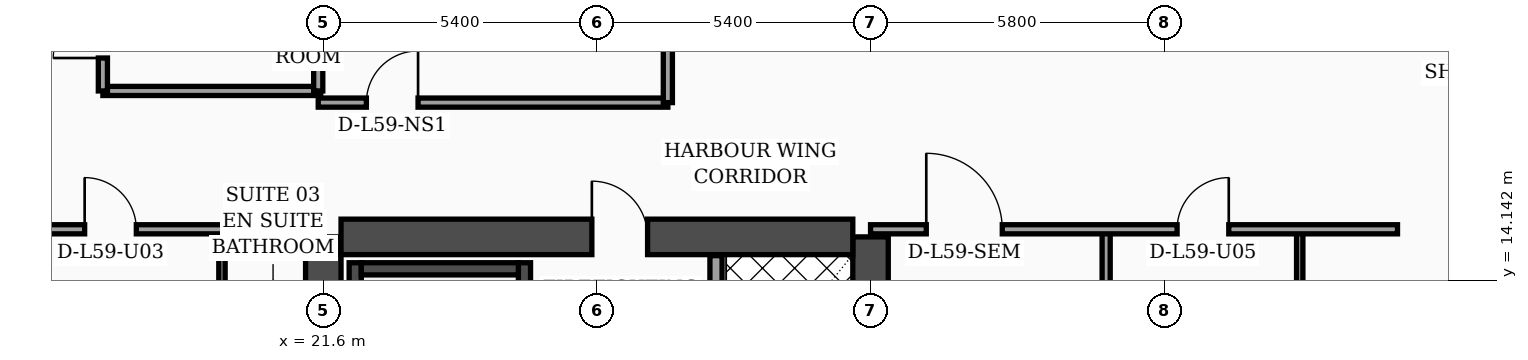
"""IFC4 building model, lengths in metres.
Left out: names, types, materials, properties, quantities, classifications, styles, units other than length and angle.
Written with IfcOpenShell. Run it as: python <this file> out.ifc"""

import sys

from ifc_helpers import new_model, si_unit, direction, frame, frame_2d, origin, place, context, subcontext, project, spatial, rectangle, extrude, element, fill, save


model = new_model("IFC4")
c1 = context("Model", 3, precision=1e-05, world=origin(), true_north=direction((0.0, 1.0)))
c2 = subcontext(c1, "Body", "Model", "MODEL_VIEW")
j1 = project(units=[si_unit("LENGTHUNIT", "METRE"), si_unit("PLANEANGLEUNIT", "RADIAN")], contexts=[c1])
p1 = place(None, origin())
s1 = spatial("IfcSite", under=j1, at=p1, CompositionType="ELEMENT")
p2 = place(p1, origin())
s2 = spatial("IfcBuilding", under=s1, at=p2, CompositionType="ELEMENT")
p3 = place(p2, frame((0.0, 0.0, 239.3)))
s3 = spatial("IfcBuildingStorey", under=s2, at=p3, CompositionType="ELEMENT", Elevation=239.3)
for number, where, z_axis, x_axis in (
    (1, (21.6, 4.6, 0.0), (0.0, 0.0, 1.0), (0.0, 1.0, 0.0)),
    (2, (32.4, 4.6, 0.0), (0.0, 0.0, 1.0), (0.0, 1.0, 0.0)),
):
    element("IfcWall", number, at=place(p3, frame(where, z_axis=z_axis, x_axis=x_axis)), inside=s3, PredefinedType="SHEAR", context=c2, shape_type="SweptSolid", body=[
        extrude(rectangle(XDim=10.4, YDim=0.7, at=frame_2d((5.2, 0.0))), origin(), (0.0, 0.0, 1.0), 4.05),
    ])
p4 = place(p3, frame((21.95, 15.0, 0.0), z_axis=(0.0, 0.0, 1.0), x_axis=(1.0, 0.0, 0.0)))
e3 = element("IfcWall", 3, at=p4, inside=s3, PredefinedType="SHEAR", context=c2, shape_type="SweptSolid", body=[
    extrude(rectangle(XDim=10.1, YDim=0.7, at=frame_2d((5.05, 0.0))), origin(), (0.0, 0.0, 1.0), 4.05),
])
p5 = place(p4, frame((4.95, 0.0, 0.0)))
e4 = element("IfcOpeningElement", 4, at=p5, cuts=e3, PredefinedType="OPENING", context=c2, shape_type="SweptSolid", body=[
    extrude(rectangle(XDim=1.1, YDim=2.2, at=frame_2d((0.55, 1.1))), frame((0.0, 0.36, 0.0), z_axis=(0.0, -1.0, 0.0), x_axis=(1.0, 0.0, 0.0)), (0.0, 0.0, 1.0), 0.72),
])
p6 = place(p3, frame((22.23, 4.95, 0.0), z_axis=(0.0, 0.0, 1.0), x_axis=(0.0, 1.0, 0.0)))
e5 = element("IfcWall", 5, at=p6, inside=s3, PredefinedType="SOLIDWALL", context=c2, shape_type="SweptSolid", body=[
    extrude(rectangle(XDim=9.54, YDim=0.24, at=frame_2d((4.77, 0.0))), origin(), (0.0, 0.0, 1.0), 4.05),
])
p7 = place(p3, frame((25.57, 4.95, 0.0), z_axis=(0.0, 0.0, 1.0), x_axis=(0.0, 1.0, 0.0)))
e6 = element("IfcWall", 6, at=p7, inside=s3, PredefinedType="SOLIDWALL", context=c2, shape_type="SweptSolid", body=[
    extrude(rectangle(XDim=9.54, YDim=0.24, at=frame_2d((4.77, 0.0))), origin(), (0.0, 0.0, 1.0), 4.05),
])
p8 = place(p7, frame((0.35, 0.0, 0.0)))
e7 = element("IfcOpeningElement", 7, at=p8, cuts=e6, PredefinedType="OPENING", context=c2, shape_type="SweptSolid", body=[
    extrude(rectangle(XDim=1.15, YDim=2.2, at=frame_2d((0.575, 1.1))), frame((0.0, 0.13, 0.0), z_axis=(0.0, -1.0, 0.0), x_axis=(1.0, 0.0, 0.0)), (0.0, 0.0, 1.0), 0.26),
])
p9 = place(p3, frame((22.35, 14.37, 0.0), z_axis=(0.0, 0.0, 1.0), x_axis=(1.0, 0.0, 0.0)))
e8 = element("IfcWall", 8, at=p9, inside=s3, PredefinedType="SOLIDWALL", context=c2, shape_type="SweptSolid", body=[
    extrude(rectangle(XDim=3.1, YDim=0.24, at=frame_2d((1.55, 0.0))), origin(), (0.0, 0.0, 1.0), 4.05),
])
p10 = place(p3, frame((49.43, 5.505, 0.0), z_axis=(0.0, 0.0, 1.0), x_axis=(-0.300509063924, 0.953778958931, 0.0)))
e9 = element("IfcWall", 9, at=p10, inside=s3, PredefinedType="SOLIDWALL", context=c2, shape_type="SweptSolid", body=[
    extrude(rectangle(XDim=30.814, YDim=0.32, at=frame_2d((15.407, 0.0))), origin(), (0.0, 0.0, 1.0), 4.05),
])
p11 = place(p10, frame((4.747, 0.0, 0.0)))
e10 = element("IfcOpeningElement", 10, at=p11, cuts=e9, PredefinedType="OPENING", context=c2, shape_type="SweptSolid", body=[
    extrude(rectangle(XDim=1.4, YDim=2.25, at=frame_2d((0.7, 1.125))), frame((0.0, 0.17, 0.0), z_axis=(0.0, -1.0, 0.0), x_axis=(1.0, 0.0, 0.0)), (0.0, 0.0, 1.0), 0.34),
])
p12 = place(p10, frame((9.889, 0.0, 0.7)))
e11 = element("IfcOpeningElement", 11, at=p12, cuts=e9, PredefinedType="OPENING", context=c2, shape_type="SweptSolid", body=[
    extrude(rectangle(XDim=1.6, YDim=1.65, at=frame_2d((0.8, 0.825))), frame((0.0, 0.17, 0.0), z_axis=(0.0, -1.0, 0.0), x_axis=(1.0, 0.0, 0.0)), (0.0, 0.0, 1.0), 0.34),
])
p13 = place(p10, frame((18.696, 0.0, 0.7)))
e12 = element("IfcOpeningElement", 12, at=p13, cuts=e9, PredefinedType="OPENING", context=c2, shape_type="SweptSolid", body=[
    extrude(rectangle(XDim=1.6, YDim=1.65, at=frame_2d((0.8, 0.825))), frame((0.0, 0.17, 0.0), z_axis=(0.0, -1.0, 0.0), x_axis=(1.0, 0.0, 0.0)), (0.0, 0.0, 1.0), 0.34),
])
p14 = place(p10, frame((1.6, 0.0, 0.75)))
e13 = element("IfcOpeningElement", 13, at=p14, cuts=e9, PredefinedType="OPENING", context=c2, shape_type="SweptSolid", body=[
    extrude(rectangle(XDim=1.5, YDim=1.6, at=frame_2d((0.75, 0.8))), frame((0.0, 0.17, 0.0), z_axis=(0.0, -1.0, 0.0), x_axis=(1.0, 0.0, 0.0)), (0.0, 0.0, 1.0), 0.34),
])
p15 = place(p10, frame((7.8, 0.0, 0.75)))
e14 = element("IfcOpeningElement", 14, at=p15, cuts=e9, PredefinedType="OPENING", context=c2, shape_type="SweptSolid", body=[
    extrude(rectangle(XDim=1.5, YDim=1.6, at=frame_2d((0.75, 0.8))), frame((0.0, 0.17, 0.0), z_axis=(0.0, -1.0, 0.0), x_axis=(1.0, 0.0, 0.0)), (0.0, 0.0, 1.0), 0.34),
])
p16 = place(p10, frame((11.95, 0.0, 0.75)))
e15 = element("IfcOpeningElement", 15, at=p16, cuts=e9, PredefinedType="OPENING", context=c2, shape_type="SweptSolid", body=[
    extrude(rectangle(XDim=1.5, YDim=1.6, at=frame_2d((0.75, 0.8))), frame((0.0, 0.17, 0.0), z_axis=(0.0, -1.0, 0.0), x_axis=(1.0, 0.0, 0.0)), (0.0, 0.0, 1.0), 0.34),
])
p17 = place(p10, frame((14.0, 0.0, 0.75)))
e16 = element("IfcOpeningElement", 16, at=p17, cuts=e9, PredefinedType="OPENING", context=c2, shape_type="SweptSolid", body=[
    extrude(rectangle(XDim=1.5, YDim=1.6, at=frame_2d((0.75, 0.8))), frame((0.0, 0.17, 0.0), z_axis=(0.0, -1.0, 0.0), x_axis=(1.0, 0.0, 0.0)), (0.0, 0.0, 1.0), 0.34),
])
p18 = place(p10, frame((16.55, 0.0, 0.75)))
e17 = element("IfcOpeningElement", 17, at=p18, cuts=e9, PredefinedType="OPENING", context=c2, shape_type="SweptSolid", body=[
    extrude(rectangle(XDim=1.5, YDim=1.6, at=frame_2d((0.75, 0.8))), frame((0.0, 0.17, 0.0), z_axis=(0.0, -1.0, 0.0), x_axis=(1.0, 0.0, 0.0)), (0.0, 0.0, 1.0), 0.34),
])
p19 = place(p10, frame((20.75, 0.0, 0.75)))
e18 = element("IfcOpeningElement", 18, at=p19, cuts=e9, PredefinedType="OPENING", context=c2, shape_type="SweptSolid", body=[
    extrude(rectangle(XDim=1.5, YDim=1.6, at=frame_2d((0.75, 0.8))), frame((0.0, 0.17, 0.0), z_axis=(0.0, -1.0, 0.0), x_axis=(1.0, 0.0, 0.0)), (0.0, 0.0, 1.0), 0.34),
])
p20 = place(p10, frame((23.3, 0.0, 0.75)))
e19 = element("IfcOpeningElement", 19, at=p20, cuts=e9, PredefinedType="OPENING", context=c2, shape_type="SweptSolid", body=[
    extrude(rectangle(XDim=1.5, YDim=1.6, at=frame_2d((0.75, 0.8))), frame((0.0, 0.17, 0.0), z_axis=(0.0, -1.0, 0.0), x_axis=(1.0, 0.0, 0.0)), (0.0, 0.0, 1.0), 0.34),
])
p21 = place(p10, frame((26.4, 0.0, 0.75)))
e20 = element("IfcOpeningElement", 20, at=p21, cuts=e9, PredefinedType="OPENING", context=c2, shape_type="SweptSolid", body=[
    extrude(rectangle(XDim=1.5, YDim=1.6, at=frame_2d((0.75, 0.8))), frame((0.0, 0.17, 0.0), z_axis=(0.0, -1.0, 0.0), x_axis=(1.0, 0.0, 0.0)), (0.0, 0.0, 1.0), 0.34),
])
p22 = place(p3, frame((29.35, 4.97, 0.0), z_axis=(0.0, 0.0, 1.0), x_axis=(0.0, 1.0, 0.0)))
e21 = element("IfcWall", 21, at=p22, inside=s3, PredefinedType="SOLIDWALL", context=c2, shape_type="SweptSolid", body=[
    extrude(rectangle(XDim=9.66, YDim=0.24, at=frame_2d((4.83, 0.0))), origin(), (0.0, 0.0, 1.0), 4.05),
])
p23 = place(p22, frame((0.55, 0.0, 0.0)))
e22 = element("IfcOpeningElement", 22, at=p23, cuts=e21, PredefinedType="OPENING", context=c2, shape_type="SweptSolid", body=[
    extrude(rectangle(XDim=1.3, YDim=2.35, at=frame_2d((0.65, 1.175))), frame((0.0, 0.13, 0.0), z_axis=(0.0, -1.0, 0.0), x_axis=(1.0, 0.0, 0.0)), (0.0, 0.0, 1.0), 0.26),
])
p24 = place(p3, frame((19.6, 2.44, 0.0), z_axis=(0.0, 0.0, 1.0), x_axis=(0.0, 1.0, 0.0)))
e23 = element("IfcWall", 23, at=p24, inside=s3, PredefinedType="PARTITIONING", context=c2, shape_type="SweptSolid", body=[
    extrude(rectangle(XDim=12.71, YDim=0.125, at=frame_2d((6.355, 0.0))), origin(), (0.0, 0.0, 1.0), 2.35),
])
p25 = place(p24, frame((4.34, 0.0, 0.0)))
e24 = element("IfcOpeningElement", 24, at=p25, cuts=e23, PredefinedType="OPENING", context=c2, shape_type="SweptSolid", body=[
    extrude(rectangle(XDim=0.96, YDim=2.2, at=frame_2d((0.48, 1.1))), frame((0.0, 0.073, 0.0), z_axis=(0.0, -1.0, 0.0), x_axis=(1.0, 0.0, 0.0)), (0.0, 0.0, 1.0), 0.145),
])
p26 = place(p24, frame((10.18, 0.0, 0.0)))
e25 = element("IfcOpeningElement", 25, at=p26, cuts=e23, PredefinedType="OPENING", context=c2, shape_type="SweptSolid", body=[
    extrude(rectangle(XDim=0.9, YDim=2.15, at=frame_2d((0.45, 1.075))), frame((0.0, 0.073, 0.0), z_axis=(0.0, -1.0, 0.0), x_axis=(1.0, 0.0, 0.0)), (0.0, 0.0, 1.0), 0.145),
])
p27 = place(p3, frame((15.15, 15.15, 0.0), z_axis=(0.0, 0.0, 1.0), x_axis=(1.0, 0.0, 0.0)))
e26 = element("IfcWall", 26, at=p27, inside=s3, PredefinedType="PARTITIONING", context=c2, shape_type="SweptSolid", body=[
    extrude(rectangle(XDim=6.45, YDim=0.18, at=frame_2d((3.225, 0.0))), origin(), (0.0, 0.0, 1.0), 2.35),
])
p28 = place(p27, frame((1.74, 0.0, 0.0)))
e27 = element("IfcOpeningElement", 27, at=p28, cuts=e26, PredefinedType="OPENING", context=c2, shape_type="SweptSolid", body=[
    extrude(rectangle(XDim=1.02, YDim=2.2, at=frame_2d((0.51, 1.1))), frame((0.0, 0.1, 0.0), z_axis=(0.0, -1.0, 0.0), x_axis=(1.0, 0.0, 0.0)), (0.0, 0.0, 1.0), 0.2),
])
p29 = place(p3, frame((17.25, 17.88, 0.0), z_axis=(0.0, 0.0, 1.0), x_axis=(1.0, 0.0, 0.0)))
e28 = element("IfcWall", 28, at=p29, inside=s3, PredefinedType="PARTITIONING", context=c2, shape_type="SweptSolid", body=[
    extrude(rectangle(XDim=4.3, YDim=0.18, at=frame_2d((2.15, 0.0))), origin(), (0.0, 0.0, 1.0), 4.05),
])
p30 = place(p3, frame((21.5, 17.88, 0.0), z_axis=(0.0, 0.0, 1.0), x_axis=(0.0, 1.0, 0.0)))
e29 = element("IfcWall", 29, at=p30, inside=s3, PredefinedType="PARTITIONING", context=c2, shape_type="SweptSolid", body=[
    extrude(rectangle(XDim=6.44, YDim=0.18, at=frame_2d((3.22, 0.0))), origin(), (0.0, 0.0, 1.0), 4.05),
])
p31 = place(p3, frame((17.25, 17.88, 0.0), z_axis=(0.0, 0.0, 1.0), x_axis=(0.0, 1.0, 0.0)))
e30 = element("IfcWall", 30, at=p31, inside=s3, PredefinedType="PARTITIONING", context=c2, shape_type="SweptSolid", body=[
    extrude(rectangle(XDim=6.44, YDim=0.18, at=frame_2d((3.22, 0.0))), origin(), (0.0, 0.0, 1.0), 4.05),
])
p32 = place(p31, frame((0.65, 0.0, 0.0)))
e31 = element("IfcOpeningElement", 31, at=p32, cuts=e30, PredefinedType="OPENING", context=c2, shape_type="SweptSolid", body=[
    extrude(rectangle(XDim=0.98, YDim=2.15, at=frame_2d((0.49, 1.075))), frame((0.0, 0.1, 0.0), z_axis=(0.0, -1.0, 0.0), x_axis=(1.0, 0.0, 0.0)), (0.0, 0.0, 1.0), 0.2),
])
p33 = place(p31, frame((3.27, 0.0, 0.0)))
e32 = element("IfcOpeningElement", 32, at=p33, cuts=e30, PredefinedType="OPENING", context=c2, shape_type="SweptSolid", body=[
    extrude(rectangle(XDim=0.96, YDim=2.2, at=frame_2d((0.48, 1.1))), frame((0.0, 0.1, 0.0), z_axis=(0.0, -1.0, 0.0), x_axis=(1.0, 0.0, 0.0)), (0.0, 0.0, 1.0), 0.2),
])
p34 = place(p3, frame((40.87, 2.44, 0.0), z_axis=(0.0, 0.0, 1.0), x_axis=(0.0, 1.0, 0.0)))
e33 = element("IfcWall", 33, at=p34, inside=s3, PredefinedType="PARTITIONING", context=c2, shape_type="SweptSolid", body=[
    extrude(rectangle(XDim=12.71, YDim=0.125, at=frame_2d((6.355, 0.0))), origin(), (0.0, 0.0, 1.0), 2.35),
])
p35 = place(p34, frame((4.35, 0.0, 0.0)))
e34 = element("IfcOpeningElement", 34, at=p35, cuts=e33, PredefinedType="OPENING", context=c2, shape_type="SweptSolid", body=[
    extrude(rectangle(XDim=0.96, YDim=2.2, at=frame_2d((0.48, 1.1))), frame((0.0, 0.073, 0.0), z_axis=(0.0, -1.0, 0.0), x_axis=(1.0, 0.0, 0.0)), (0.0, 0.0, 1.0), 0.145),
])
p36 = place(p34, frame((10.21, 0.0, 0.0)))
e35 = element("IfcOpeningElement", 35, at=p36, cuts=e33, PredefinedType="OPENING", context=c2, shape_type="SweptSolid", body=[
    extrude(rectangle(XDim=0.9, YDim=2.15, at=frame_2d((0.45, 1.075))), frame((0.0, 0.073, 0.0), z_axis=(0.0, -1.0, 0.0), x_axis=(1.0, 0.0, 0.0)), (0.0, 0.0, 1.0), 0.145),
])
p37 = place(p3, frame((37.05, 2.44, 0.0), z_axis=(0.0, 0.0, 1.0), x_axis=(0.0, 1.0, 0.0)))
e36 = element("IfcWall", 36, at=p37, inside=s3, PredefinedType="PARTITIONING", context=c2, shape_type="SweptSolid", body=[
    extrude(rectangle(XDim=12.71, YDim=0.16, at=frame_2d((6.355, 0.0))), origin(), (0.0, 0.0, 1.0), 2.35),
])
p38 = place(p3, frame((32.4, 15.15, 0.0), z_axis=(0.0, 0.0, 1.0), x_axis=(1.0, 0.0, 0.0)))
e37 = element("IfcWall", 37, at=p38, inside=s3, PredefinedType="PARTITIONING", context=c2, shape_type="SweptSolid", body=[
    extrude(rectangle(XDim=10.4, YDim=0.18, at=frame_2d((5.2, 0.0))), origin(), (0.0, 0.0, 1.0), 2.35),
])
p39 = place(p38, frame((1.1, 0.0, 0.0)))
e38 = element("IfcOpeningElement", 38, at=p39, cuts=e37, PredefinedType="OPENING", context=c2, shape_type="SweptSolid", body=[
    extrude(rectangle(XDim=1.5, YDim=2.22, at=frame_2d((0.75, 1.11))), frame((0.0, 0.1, 0.0), z_axis=(0.0, -1.0, 0.0), x_axis=(1.0, 0.0, 0.0)), (0.0, 0.0, 1.0), 0.2),
])
p40 = place(p38, frame((6.05, 0.0, 0.0)))
e39 = element("IfcOpeningElement", 39, at=p40, cuts=e37, PredefinedType="OPENING", context=c2, shape_type="SweptSolid", body=[
    extrude(rectangle(XDim=1.02, YDim=2.2, at=frame_2d((0.51, 1.1))), frame((0.0, 0.1, 0.0), z_axis=(0.0, -1.0, 0.0), x_axis=(1.0, 0.0, 0.0)), (0.0, 0.0, 1.0), 0.2),
])
p41 = place(p3, frame((21.5, 17.65, 0.0), z_axis=(0.0, 0.0, 1.0), x_axis=(1.0, 0.0, 0.0)))
e40 = element("IfcWall", 40, at=p41, inside=s3, PredefinedType="PARTITIONING", context=c2, shape_type="SweptSolid", body=[
    extrude(rectangle(XDim=6.9, YDim=0.18, at=frame_2d((3.45, 0.0))), origin(), (0.0, 0.0, 1.0), 2.35),
])
p42 = place(p41, frame((0.95, 0.0, 0.0)))
e41 = element("IfcOpeningElement", 41, at=p42, cuts=e40, PredefinedType="OPENING", context=c2, shape_type="SweptSolid", body=[
    extrude(rectangle(XDim=1.02, YDim=2.2, at=frame_2d((0.51, 1.1))), frame((0.0, 0.1, 0.0), z_axis=(0.0, -1.0, 0.0), x_axis=(1.0, 0.0, 0.0)), (0.0, 0.0, 1.0), 0.2),
])
p43 = place(p3, frame((28.4, 17.65, 0.0), z_axis=(0.0, 0.0, 1.0), x_axis=(0.0, 1.0, 0.0)))
e42 = element("IfcWall", 42, at=p43, inside=s3, PredefinedType="PARTITIONING", context=c2, shape_type="SweptSolid", body=[
    extrude(rectangle(XDim=13.16, YDim=0.18, at=frame_2d((6.58, 0.0))), origin(), (0.0, 0.0, 1.0), 2.35),
])
p44 = place(p28, origin())
e43 = element("IfcDoor", 43, at=p44, inside=s3, OperationType="SINGLE_SWING_LEFT", PredefinedType="DOOR", context=c2, shape_type="SweptSolid", body=[
    extrude(rectangle(XDim=1.02, YDim=2.2, at=frame_2d((0.51, 1.1))), frame((0.0, 0.025, 0.0), z_axis=(0.0, -1.0, 0.0), x_axis=(1.0, 0.0, 0.0)), (0.0, 0.0, 1.0), 0.05),
])
fill(e27, e43)
p45 = place(p32, origin())
e44 = element("IfcDoor", 44, at=p45, inside=s3, OperationType="SINGLE_SWING_LEFT", PredefinedType="DOOR", context=c2, shape_type="SweptSolid", body=[
    extrude(rectangle(XDim=0.98, YDim=2.15, at=frame_2d((0.49, 1.075))), frame((0.0, 0.025, 0.0), z_axis=(0.0, -1.0, 0.0), x_axis=(1.0, 0.0, 0.0)), (0.0, 0.0, 1.0), 0.05),
])
fill(e31, e44)
p46 = place(p39, origin())
e45 = element("IfcDoor", 45, at=p46, inside=s3, OperationType="SINGLE_SWING_LEFT", PredefinedType="DOOR", context=c2, shape_type="SweptSolid", body=[
    extrude(rectangle(XDim=1.5, YDim=2.22, at=frame_2d((0.75, 1.11))), frame((0.0, 0.025, 0.0), z_axis=(0.0, -1.0, 0.0), x_axis=(1.0, 0.0, 0.0)), (0.0, 0.0, 1.0), 0.05),
])
fill(e38, e45)
p47 = place(p40, origin())
e46 = element("IfcDoor", 46, at=p47, inside=s3, OperationType="SINGLE_SWING_RIGHT", PredefinedType="DOOR", context=c2, shape_type="SweptSolid", body=[
    extrude(rectangle(XDim=1.02, YDim=2.2, at=frame_2d((0.51, 1.1))), frame((0.0, 0.025, 0.0), z_axis=(0.0, -1.0, 0.0), x_axis=(1.0, 0.0, 0.0)), (0.0, 0.0, 1.0), 0.05),
])
fill(e39, e46)
p48 = place(p42, origin())
e47 = element("IfcDoor", 47, at=p48, inside=s3, OperationType="SINGLE_SWING_RIGHT", PredefinedType="DOOR", context=c2, shape_type="SweptSolid", body=[
    extrude(rectangle(XDim=1.02, YDim=2.2, at=frame_2d((0.51, 1.1))), frame((0.0, 0.025, 0.0), z_axis=(0.0, -1.0, 0.0), x_axis=(1.0, 0.0, 0.0)), (0.0, 0.0, 1.0), 0.05),
])
fill(e41, e47)
p49 = place(p5, origin())
e48 = element("IfcDoor", 48, at=p49, inside=s3, OperationType="SINGLE_SWING_LEFT", PredefinedType="DOOR", context=c2, shape_type="SweptSolid", body=[
    extrude(rectangle(XDim=1.1, YDim=2.2, at=frame_2d((0.55, 1.1))), frame((0.0, 0.025, 0.0), z_axis=(0.0, -1.0, 0.0), x_axis=(1.0, 0.0, 0.0)), (0.0, 0.0, 1.0), 0.05),
])
fill(e4, e48)
save(model, sys.argv[1])
